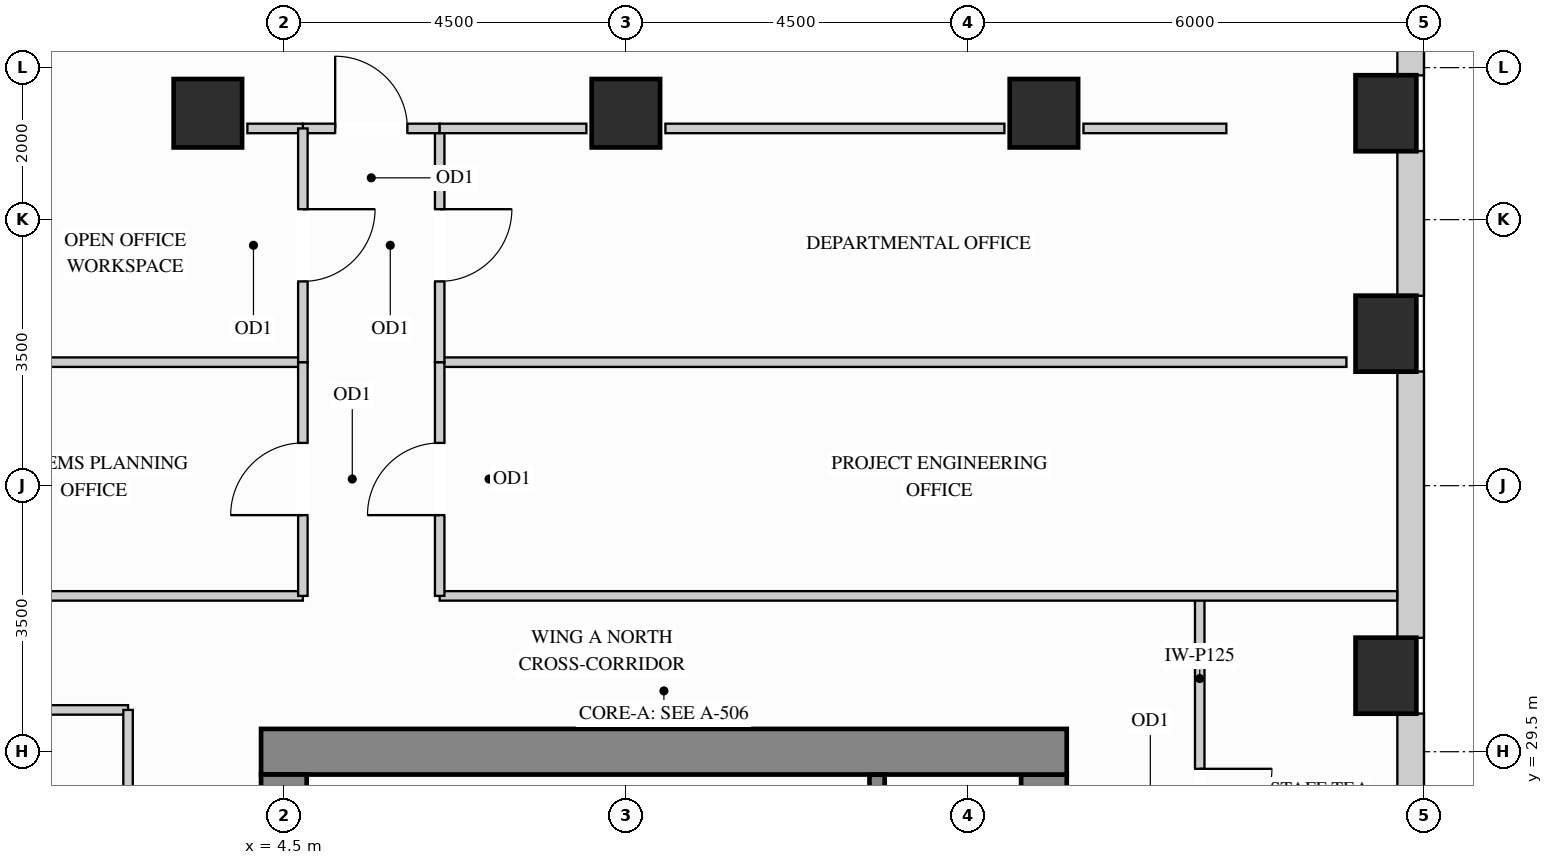
"""IFC4 building model, lengths in metres.
Left out: names, types, materials, properties, quantities, classifications, styles, units other than length and angle.
Written with IfcOpenShell. Run it as: python <this file> out.ifc"""

import sys

from ifc_helpers import new_model, si_unit, direction, frame, frame_2d, origin, origin_2d, place, context, subcontext, project, spatial, rectangle, extrude, source, transform, mapped, element, fill, save


model = new_model("IFC4")
c1 = context("Model", 3, precision=1e-05, world=origin(), true_north=direction((0.0, 1.0)))
c2 = subcontext(c1, "Body", "Model", "MODEL_VIEW")
j1 = project(units=[si_unit("LENGTHUNIT", "METRE"), si_unit("PLANEANGLEUNIT", "RADIAN")], contexts=[c1])
p1 = place(None, origin())
s1 = spatial("IfcSite", under=j1, at=p1, CompositionType="ELEMENT")
p2 = place(p1, origin())
s2 = spatial("IfcBuilding", under=s1, at=p2, CompositionType="ELEMENT")
p3 = place(p2, frame((0.0, 0.0, 204.3)))
s3 = spatial("IfcBuildingStorey", under=s2, at=p3, CompositionType="ELEMENT", Elevation=204.3)
m1 = source(origin(), c2, "Body", "SweptSolid", [
    extrude(rectangle(XDim=0.9, YDim=0.9, at=origin_2d()), origin(), (0.0, 0.0, 1.0), 3.32),
])
for number, where, z_axis, x_axis in (
    (1, (14.5, 37.9, 0.0), (0.0, 0.0, 1.0), (1.0, 0.0, 0.0)),
    (2, (3.5, 37.9, 0.0), (0.0, 0.0, 1.0), (1.0, 0.0, 0.0)),
    (3, (9.0, 37.9, 0.0), (0.0, 0.0, 1.0), (1.0, 0.0, 0.0)),
):
    element("IfcColumn", number, at=place(p3, frame(where, z_axis=z_axis, x_axis=x_axis)), inside=s3, PredefinedType="COLUMN", context=c2, shape_type="MappedRepresentation", body=[
        mapped(m1, transform((0.0, 0.0, 0.0), x_axis=(1.0, 0.0, 0.0), y_axis=(0.0, 1.0, 0.0), z_axis=(0.0, 0.0, 1.0))),
    ])
m2 = source(origin(), c2, "Body", "SweptSolid", [
    extrude(rectangle(XDim=0.8, YDim=1.0, at=origin_2d()), origin(), (0.0, 0.0, 1.0), 3.32),
])
for number, where, z_axis, x_axis in (
    (4, (19.0, 30.5, 0.0), (0.0, 0.0, 1.0), (1.0, 0.0, 0.0)),
    (5, (19.0, 35.0, 0.0), (0.0, 0.0, 1.0), (1.0, 0.0, 0.0)),
    (6, (19.0, 37.9, 0.0), (0.0, 0.0, 1.0), (1.0, 0.0, 0.0)),
):
    element("IfcColumn", number, at=place(p3, frame(where, z_axis=z_axis, x_axis=x_axis)), inside=s3, PredefinedType="COLUMN", context=c2, shape_type="MappedRepresentation", body=[
        mapped(m2, transform((0.0, 0.0, 0.0), x_axis=(1.0, 0.0, 0.0), y_axis=(0.0, 1.0, 0.0), z_axis=(0.0, 0.0, 1.0))),
    ])
m3 = source(origin(), c2, "Body", "SweptSolid", [
    extrude(rectangle(XDim=8.32, YDim=0.6, at=frame_2d((4.16, 0.0))), origin(), (0.0, 0.0, 1.0), 3.32),
])
p4 = place(p3, frame((14.5, 20.88, 0.0), z_axis=(0.0, 0.0, 1.0), x_axis=(0.0, 1.0, 0.0)))
e7 = element("IfcWall", 7, at=p4, inside=s3, PredefinedType="SHEAR", context=c2, shape_type="MappedRepresentation", body=[
    mapped(m3, transform((0.0, 0.0, 0.0), x_axis=(1.0, 0.0, 0.0), y_axis=(0.0, 1.0, 0.0), z_axis=(0.0, 0.0, 1.0))),
])
m4 = source(origin(), c2, "Body", "SweptSolid", [
    extrude(rectangle(XDim=10.6, YDim=0.6, at=frame_2d((5.3, 0.0))), origin(), (0.0, 0.0, 1.0), 3.32),
])
p5 = place(p3, frame((4.2, 29.5, 0.0), z_axis=(0.0, 0.0, 1.0), x_axis=(1.0, 0.0, 0.0)))
e8 = element("IfcWall", 8, at=p5, inside=s3, PredefinedType="SHEAR", context=c2, shape_type="MappedRepresentation", body=[
    mapped(m4, transform((0.0, 0.0, 0.0), x_axis=(1.0, 0.0, 0.0), y_axis=(0.0, 1.0, 0.0), z_axis=(0.0, 0.0, 1.0))),
])
m5 = source(origin(), c2, "Body", "SweptSolid", [
    extrude(rectangle(XDim=20.4, YDim=0.6, at=frame_2d((10.2, 0.0))), origin(), (0.0, 0.0, 1.0), 3.32),
])
p6 = place(p3, frame((4.5, 8.8, 0.0), z_axis=(0.0, 0.0, 1.0), x_axis=(0.0, 1.0, 0.0)))
e9 = element("IfcWall", 9, at=p6, inside=s3, PredefinedType="SHEAR", context=c2, shape_type="MappedRepresentation", body=[
    mapped(m5, transform((0.0, 0.0, 0.0), x_axis=(1.0, 0.0, 0.0), y_axis=(0.0, 1.0, 0.0), z_axis=(0.0, 0.0, 1.0))),
])
p7 = place(p3, frame((19.325, 27.298, 0.0), z_axis=(0.0, 0.0, 1.0), x_axis=(0.0, 1.0, 0.0)))
e10 = element("IfcWall", 10, at=p7, inside=s3, PredefinedType="SOLIDWALL", context=c2, shape_type="SweptSolid", body=[
    extrude(rectangle(XDim=2.704, YDim=0.35, at=frame_2d((1.352, 0.0))), origin(), (0.0, 0.0, 1.0), 2.532),
])
p8 = place(p7, frame((0.524, 0.0, 0.78)))
e11 = element("IfcOpeningElement", 11, at=p8, cuts=e10, PredefinedType="OPENING", context=c2, shape_type="SweptSolid", body=[
    extrude(rectangle(XDim=1.2, YDim=1.572, at=frame_2d((0.6, 0.786))), frame((0.0, 0.185, 0.0), z_axis=(0.0, -1.0, 0.0), x_axis=(1.0, 0.0, 0.0)), (0.0, 0.0, 1.0), 0.37),
])
m6 = source(origin(), c2, "Body", "SweptSolid", [
    extrude(rectangle(XDim=3.504, YDim=0.35, at=frame_2d((1.752, 0.0))), origin(), (0.0, 0.0, 1.0), 2.532),
])
p9 = place(p3, frame((19.325, 30.998, 0.0), z_axis=(0.0, 0.0, 1.0), x_axis=(0.0, 1.0, 0.0)))
e12 = element("IfcWall", 12, at=p9, inside=s3, PredefinedType="SOLIDWALL", context=c2, shape_type="MappedRepresentation", body=[
    mapped(m6, transform((0.0, 0.0, 0.0), x_axis=(1.0, 0.0, 0.0), y_axis=(0.0, 1.0, 0.0), z_axis=(0.0, 0.0, 1.0))),
])
m7 = source(origin(), c2, "Body", "SweptSolid", [
    extrude(rectangle(XDim=1.904, YDim=0.35, at=frame_2d((0.952, 0.0))), origin(), (0.0, 0.0, 1.0), 2.532),
])
p10 = place(p3, frame((19.325, 35.498, 0.0), z_axis=(0.0, 0.0, 1.0), x_axis=(0.0, 1.0, 0.0)))
e13 = element("IfcWall", 13, at=p10, inside=s3, PredefinedType="SOLIDWALL", context=c2, shape_type="MappedRepresentation", body=[
    mapped(m7, transform((0.0, 0.0, 0.0), x_axis=(1.0, 0.0, 0.0), y_axis=(0.0, 1.0, 0.0), z_axis=(0.0, 0.0, 1.0))),
])
m8 = source(origin(), c2, "Body", "SweptSolid", [
    extrude(rectangle(XDim=0.754, YDim=0.35, at=frame_2d((0.377, 0.0))), origin(), (0.0, 0.0, 1.0), 3.305),
])
p11 = place(p3, frame((19.325, 38.398, 0.0), z_axis=(0.0, 0.0, 1.0), x_axis=(0.0, 1.0, 0.0)))
e14 = element("IfcWall", 14, at=p11, inside=s3, PredefinedType="SOLIDWALL", context=c2, shape_type="MappedRepresentation", body=[
    mapped(m8, transform((0.0, 0.0, 0.0), x_axis=(1.0, 0.0, 0.0), y_axis=(0.0, 1.0, 0.0), z_axis=(0.0, 0.0, 1.0))),
])
p12 = place(p3, frame((16.55, 26.05, 0.0), z_axis=(0.0, 0.0, 1.0), x_axis=(0.0, 1.0, 0.0)))
e15 = element("IfcWall", 15, at=p12, inside=s3, PredefinedType="PARTITIONING", context=c2, shape_type="SweptSolid", body=[
    extrude(rectangle(XDim=5.5, YDim=0.125, at=frame_2d((2.75, 0.0))), origin(), (0.0, 0.0, 1.0), 3.305),
])
p13 = place(p12, frame((2.275, 0.0, 0.0)))
e16 = element("IfcOpeningElement", 16, at=p13, cuts=e15, PredefinedType="OPENING", context=c2, shape_type="SweptSolid", body=[
    extrude(rectangle(XDim=0.95, YDim=2.15, at=frame_2d((0.475, 1.075))), frame((0.0, 0.073, 0.0), z_axis=(0.0, -1.0, 0.0), x_axis=(1.0, 0.0, 0.0)), (0.0, 0.0, 1.0), 0.145),
])
m9 = source(origin(), c2, "Body", "SweptSolid", [
    extrude(rectangle(XDim=11.93, YDim=0.125, at=frame_2d((5.965, 0.0))), origin(), (0.0, 0.0, 1.0), 3.305),
])
p14 = place(p3, frame((6.55, 34.625, 0.0), z_axis=(0.0, 0.0, 1.0), x_axis=(1.0, 0.0, 0.0)))
e17 = element("IfcWall", 17, at=p14, inside=s3, PredefinedType="PARTITIONING", context=c2, shape_type="MappedRepresentation", body=[
    mapped(m9, transform((0.0, 0.0, 0.0), x_axis=(1.0, 0.0, 0.0), y_axis=(0.0, 1.0, 0.0), z_axis=(0.0, 0.0, 1.0))),
])
m10 = source(origin(), c2, "Body", "SweptSolid", [
    extrude(rectangle(XDim=12.598, YDim=0.125, at=frame_2d((6.299, 0.0))), origin(), (0.0, 0.0, 1.0), 3.305),
])
p15 = place(p3, frame((6.55, 31.55, 0.0), z_axis=(0.0, 0.0, 1.0), x_axis=(1.0, 0.0, 0.0)))
e18 = element("IfcWall", 18, at=p15, inside=s3, PredefinedType="PARTITIONING", context=c2, shape_type="MappedRepresentation", body=[
    mapped(m10, transform((0.0, 0.0, 0.0), x_axis=(1.0, 0.0, 0.0), y_axis=(0.0, 1.0, 0.0), z_axis=(0.0, 0.0, 1.0))),
])
m11 = source(origin(), c2, "Body", "SweptSolid", [
    extrude(rectangle(XDim=4.398, YDim=0.125, at=frame_2d((2.199, 0.0))), origin(), (0.0, 0.0, 1.0), 3.305),
])
p16 = place(p3, frame((0.352, 31.55, 0.0), z_axis=(0.0, 0.0, 1.0), x_axis=(1.0, 0.0, 0.0)))
e19 = element("IfcWall", 19, at=p16, inside=s3, PredefinedType="PARTITIONING", context=c2, shape_type="MappedRepresentation", body=[
    mapped(m11, transform((0.0, 0.0, 0.0), x_axis=(1.0, 0.0, 0.0), y_axis=(0.0, 1.0, 0.0), z_axis=(0.0, 0.0, 1.0))),
])
m12 = source(origin(), c2, "Body", "SweptSolid", [
    extrude(rectangle(XDim=3.63, YDim=0.125, at=frame_2d((1.815, 0.0))), origin(), (0.0, 0.0, 1.0), 3.305),
])
p17 = place(p3, frame((1.12, 34.625, 0.0), z_axis=(0.0, 0.0, 1.0), x_axis=(1.0, 0.0, 0.0)))
e20 = element("IfcWall", 20, at=p17, inside=s3, PredefinedType="PARTITIONING", context=c2, shape_type="MappedRepresentation", body=[
    mapped(m12, transform((0.0, 0.0, 0.0), x_axis=(1.0, 0.0, 0.0), y_axis=(0.0, 1.0, 0.0), z_axis=(0.0, 0.0, 1.0))),
])
m13 = source(origin(), c2, "Body", "SweptSolid", [
    extrude(rectangle(XDim=1.33, YDim=0.125, at=frame_2d((0.665, 0.0))), origin(), (0.0, 0.0, 1.0), 3.305),
])
p18 = place(p3, frame((1.12, 30.05, 0.0), z_axis=(0.0, 0.0, 1.0), x_axis=(1.0, 0.0, 0.0)))
e21 = element("IfcWall", 21, at=p18, inside=s3, PredefinedType="PARTITIONING", context=c2, shape_type="MappedRepresentation", body=[
    mapped(m13, transform((0.0, 0.0, 0.0), x_axis=(1.0, 0.0, 0.0), y_axis=(0.0, 1.0, 0.0), z_axis=(0.0, 0.0, 1.0))),
])
p19 = place(p3, frame((6.55, 31.55, 0.0), z_axis=(0.0, 0.0, 1.0), x_axis=(0.0, 1.0, 0.0)))
e22 = element("IfcWall", 22, at=p19, inside=s3, PredefinedType="PARTITIONING", context=c2, shape_type="SweptSolid", body=[
    extrude(rectangle(XDim=3.075, YDim=0.125, at=frame_2d((1.538, 0.0))), origin(), (0.0, 0.0, 1.0), 3.305),
])
p20 = place(p19, frame((1.062, 0.0, 0.0)))
e23 = element("IfcOpeningElement", 23, at=p20, cuts=e22, PredefinedType="OPENING", context=c2, shape_type="SweptSolid", body=[
    extrude(rectangle(XDim=0.95, YDim=2.15, at=frame_2d((0.475, 1.075))), frame((0.0, 0.073, 0.0), z_axis=(0.0, -1.0, 0.0), x_axis=(1.0, 0.0, 0.0)), (0.0, 0.0, 1.0), 0.145),
])
p21 = place(p3, frame((6.55, 34.625, 0.0), z_axis=(0.0, 0.0, 1.0), x_axis=(0.0, 1.0, 0.0)))
e24 = element("IfcWall", 24, at=p21, inside=s3, PredefinedType="PARTITIONING", context=c2, shape_type="SweptSolid", body=[
    extrude(rectangle(XDim=3.075, YDim=0.125, at=frame_2d((1.538, 0.0))), origin(), (0.0, 0.0, 1.0), 3.305),
])
p22 = place(p21, frame((1.062, 0.0, 0.0)))
e25 = element("IfcOpeningElement", 25, at=p22, cuts=e24, PredefinedType="OPENING", context=c2, shape_type="SweptSolid", body=[
    extrude(rectangle(XDim=0.95, YDim=2.15, at=frame_2d((0.475, 1.075))), frame((0.0, 0.073, 0.0), z_axis=(0.0, -1.0, 0.0), x_axis=(1.0, 0.0, 0.0)), (0.0, 0.0, 1.0), 0.145),
])
p23 = place(p3, frame((4.75, 37.7, 0.0), z_axis=(0.0, 0.0, 1.0), x_axis=(1.0, 0.0, 0.0)))
e26 = element("IfcWall", 26, at=p23, inside=s3, PredefinedType="PARTITIONING", context=c2, shape_type="SweptSolid", body=[
    extrude(rectangle(XDim=1.8, YDim=0.125, at=frame_2d((0.9, 0.0))), origin(), (0.0, 0.0, 1.0), 2.693),
])
p24 = place(p23, frame((0.425, 0.0, 0.0)))
e27 = element("IfcOpeningElement", 27, at=p24, cuts=e26, PredefinedType="OPENING", context=c2, shape_type="SweptSolid", body=[
    extrude(rectangle(XDim=0.95, YDim=2.15, at=frame_2d((0.475, 1.075))), frame((0.0, 0.073, 0.0), z_axis=(0.0, -1.0, 0.0), x_axis=(1.0, 0.0, 0.0)), (0.0, 0.0, 1.0), 0.145),
])
m14 = source(origin(), c2, "Body", "SweptSolid", [
    extrude(rectangle(XDim=1.93, YDim=0.125, at=frame_2d((0.965, 0.0))), origin(), (0.0, 0.0, 1.0), 2.693),
])
p25 = place(p3, frame((6.55, 37.7, 0.0), z_axis=(0.0, 0.0, 1.0), x_axis=(1.0, 0.0, 0.0)))
e28 = element("IfcWall", 28, at=p25, inside=s3, PredefinedType="PARTITIONING", context=c2, shape_type="MappedRepresentation", body=[
    mapped(m14, transform((0.0, 0.0, 0.0), x_axis=(1.0, 0.0, 0.0), y_axis=(0.0, 1.0, 0.0), z_axis=(0.0, 0.0, 1.0))),
])
m15 = source(origin(), c2, "Body", "SweptSolid", [
    extrude(rectangle(XDim=4.46, YDim=0.125, at=frame_2d((2.23, 0.0))), origin(), (0.0, 0.0, 1.0), 2.693),
])
p26 = place(p3, frame((9.52, 37.7, 0.0), z_axis=(0.0, 0.0, 1.0), x_axis=(1.0, 0.0, 0.0)))
e29 = element("IfcWall", 29, at=p26, inside=s3, PredefinedType="PARTITIONING", context=c2, shape_type="MappedRepresentation", body=[
    mapped(m15, transform((0.0, 0.0, 0.0), x_axis=(1.0, 0.0, 0.0), y_axis=(0.0, 1.0, 0.0), z_axis=(0.0, 0.0, 1.0))),
])
m16 = source(origin(), c2, "Body", "SweptSolid", [
    extrude(rectangle(XDim=1.88, YDim=0.125, at=frame_2d((0.94, 0.0))), origin(), (0.0, 0.0, 1.0), 2.693),
])
p27 = place(p3, frame((15.02, 37.7, 0.0), z_axis=(0.0, 0.0, 1.0), x_axis=(1.0, 0.0, 0.0)))
e30 = element("IfcWall", 30, at=p27, inside=s3, PredefinedType="PARTITIONING", context=c2, shape_type="MappedRepresentation", body=[
    mapped(m16, transform((0.0, 0.0, 0.0), x_axis=(1.0, 0.0, 0.0), y_axis=(0.0, 1.0, 0.0), z_axis=(0.0, 0.0, 1.0))),
])
m17 = source(origin(), c2, "Body", "SweptSolid", [
    extrude(rectangle(XDim=0.73, YDim=0.125, at=frame_2d((0.365, 0.0))), origin(), (0.0, 0.0, 1.0), 2.693),
])
p28 = place(p3, frame((4.02, 37.7, 0.0), z_axis=(0.0, 0.0, 1.0), x_axis=(1.0, 0.0, 0.0)))
e31 = element("IfcWall", 31, at=p28, inside=s3, PredefinedType="PARTITIONING", context=c2, shape_type="MappedRepresentation", body=[
    mapped(m17, transform((0.0, 0.0, 0.0), x_axis=(1.0, 0.0, 0.0), y_axis=(0.0, 1.0, 0.0), z_axis=(0.0, 0.0, 1.0))),
])
p29 = place(p3, frame((4.75, 31.55, 0.0), z_axis=(0.0, 0.0, 1.0), x_axis=(0.0, 1.0, 0.0)))
e32 = element("IfcWall", 32, at=p29, inside=s3, PredefinedType="PARTITIONING", context=c2, shape_type="SweptSolid", body=[
    extrude(rectangle(XDim=3.075, YDim=0.125, at=frame_2d((1.538, 0.0))), origin(), (0.0, 0.0, 1.0), 3.305),
])
p30 = place(p29, frame((1.062, 0.0, 0.0)))
e33 = element("IfcOpeningElement", 33, at=p30, cuts=e32, PredefinedType="OPENING", context=c2, shape_type="SweptSolid", body=[
    extrude(rectangle(XDim=0.95, YDim=2.15, at=frame_2d((0.475, 1.075))), frame((0.0, 0.073, 0.0), z_axis=(0.0, -1.0, 0.0), x_axis=(1.0, 0.0, 0.0)), (0.0, 0.0, 1.0), 0.145),
])
p31 = place(p3, frame((4.75, 34.625, 0.0), z_axis=(0.0, 0.0, 1.0), x_axis=(0.0, 1.0, 0.0)))
e34 = element("IfcWall", 34, at=p31, inside=s3, PredefinedType="PARTITIONING", context=c2, shape_type="SweptSolid", body=[
    extrude(rectangle(XDim=3.075, YDim=0.125, at=frame_2d((1.538, 0.0))), origin(), (0.0, 0.0, 1.0), 3.305),
])
p32 = place(p31, frame((1.062, 0.0, 0.0)))
e35 = element("IfcOpeningElement", 35, at=p32, cuts=e34, PredefinedType="OPENING", context=c2, shape_type="SweptSolid", body=[
    extrude(rectangle(XDim=0.95, YDim=2.15, at=frame_2d((0.475, 1.075))), frame((0.0, 0.073, 0.0), z_axis=(0.0, -1.0, 0.0), x_axis=(1.0, 0.0, 0.0)), (0.0, 0.0, 1.0), 0.145),
])
p33 = place(p3, frame((2.45, 22.6, 0.0), z_axis=(0.0, 0.0, 1.0), x_axis=(0.0, 1.0, 0.0)))
e36 = element("IfcWall", 36, at=p33, inside=s3, PredefinedType="PARTITIONING", context=c2, shape_type="SweptSolid", body=[
    extrude(rectangle(XDim=7.45, YDim=0.125, at=frame_2d((3.725, 0.0))), origin(), (0.0, 0.0, 1.0), 3.305),
])
p34 = place(p33, frame((3.25, 0.0, 0.0)))
e37 = element("IfcOpeningElement", 37, at=p34, cuts=e36, PredefinedType="OPENING", context=c2, shape_type="SweptSolid", body=[
    extrude(rectangle(XDim=0.95, YDim=2.15, at=frame_2d((0.475, 1.075))), frame((0.0, 0.073, 0.0), z_axis=(0.0, -1.0, 0.0), x_axis=(1.0, 0.0, 0.0)), (0.0, 0.0, 1.0), 0.145),
])
m18 = source(origin(), c2, "Body", "SweptSolid", [
    extrude(rectangle(XDim=3.753, YDim=0.2, at=frame_2d((1.876, 0.0))), origin(), (0.0, 0.0, 1.0), 3.32),
])
p35 = place(p3, frame((12.305, 25.445, 0.0), z_axis=(0.0, 0.0, 1.0), x_axis=(0.0, 1.0, 0.0)))
e38 = element("IfcWall", 38, at=p35, inside=s3, PredefinedType="SHEAR", context=c2, shape_type="MappedRepresentation", body=[
    mapped(m18, transform((0.0, 0.0, 0.0), x_axis=(1.0, 0.0, 0.0), y_axis=(0.0, 1.0, 0.0), z_axis=(0.0, 0.0, 1.0))),
])
m19 = source(origin(), c2, "Body", "SweptSolid", [
    extrude(rectangle(XDim=0.95, YDim=2.15, at=frame_2d((0.475, 1.075))), frame((0.0, 0.025, 0.0), z_axis=(0.0, -1.0, 0.0), x_axis=(1.0, 0.0, 0.0)), (0.0, 0.0, 1.0), 0.05),
])
p36 = place(p13, origin())
e39 = element("IfcDoor", 39, at=p36, inside=s3, OperationType="SINGLE_SWING_RIGHT", PredefinedType="DOOR", context=c2, shape_type="MappedRepresentation", body=[
    mapped(m19, transform((0.0, 0.0, 0.0), x_axis=(1.0, 0.0, 0.0), y_axis=(0.0, 1.0, 0.0), z_axis=(0.0, 0.0, 1.0))),
])
fill(e16, e39)
p37 = place(p20, origin())
e40 = element("IfcDoor", 40, at=p37, inside=s3, OperationType="SINGLE_SWING_LEFT", PredefinedType="DOOR", context=c2, shape_type="MappedRepresentation", body=[
    mapped(m19, transform((0.0, 0.0, 0.0), x_axis=(1.0, 0.0, 0.0), y_axis=(0.0, 1.0, 0.0), z_axis=(0.0, 0.0, 1.0))),
])
fill(e23, e40)
p38 = place(p22, origin())
e41 = element("IfcDoor", 41, at=p38, inside=s3, OperationType="SINGLE_SWING_RIGHT", PredefinedType="DOOR", context=c2, shape_type="MappedRepresentation", body=[
    mapped(m19, transform((0.0, 0.0, 0.0), x_axis=(1.0, 0.0, 0.0), y_axis=(0.0, 1.0, 0.0), z_axis=(0.0, 0.0, 1.0))),
])
fill(e25, e41)
p39 = place(p24, origin())
e42 = element("IfcDoor", 42, at=p39, inside=s3, OperationType="SINGLE_SWING_LEFT", PredefinedType="DOOR", context=c2, shape_type="MappedRepresentation", body=[
    mapped(m19, transform((0.0, 0.0, 0.0), x_axis=(1.0, 0.0, 0.0), y_axis=(0.0, 1.0, 0.0), z_axis=(0.0, 0.0, 1.0))),
])
fill(e27, e42)
p40 = place(p30, origin())
e43 = element("IfcDoor", 43, at=p40, inside=s3, OperationType="SINGLE_SWING_LEFT", PredefinedType="DOOR", context=c2, shape_type="MappedRepresentation", body=[
    mapped(m19, transform((0.0, 0.0, 0.0), x_axis=(1.0, 0.0, 0.0), y_axis=(0.0, 1.0, 0.0), z_axis=(0.0, 0.0, 1.0))),
])
fill(e33, e43)
p41 = place(p32, origin())
e44 = element("IfcDoor", 44, at=p41, inside=s3, OperationType="SINGLE_SWING_RIGHT", PredefinedType="DOOR", context=c2, shape_type="MappedRepresentation", body=[
    mapped(m19, transform((0.0, 0.0, 0.0), x_axis=(1.0, 0.0, 0.0), y_axis=(0.0, 1.0, 0.0), z_axis=(0.0, 0.0, 1.0))),
])
fill(e35, e44)
save(model, sys.argv[1])
